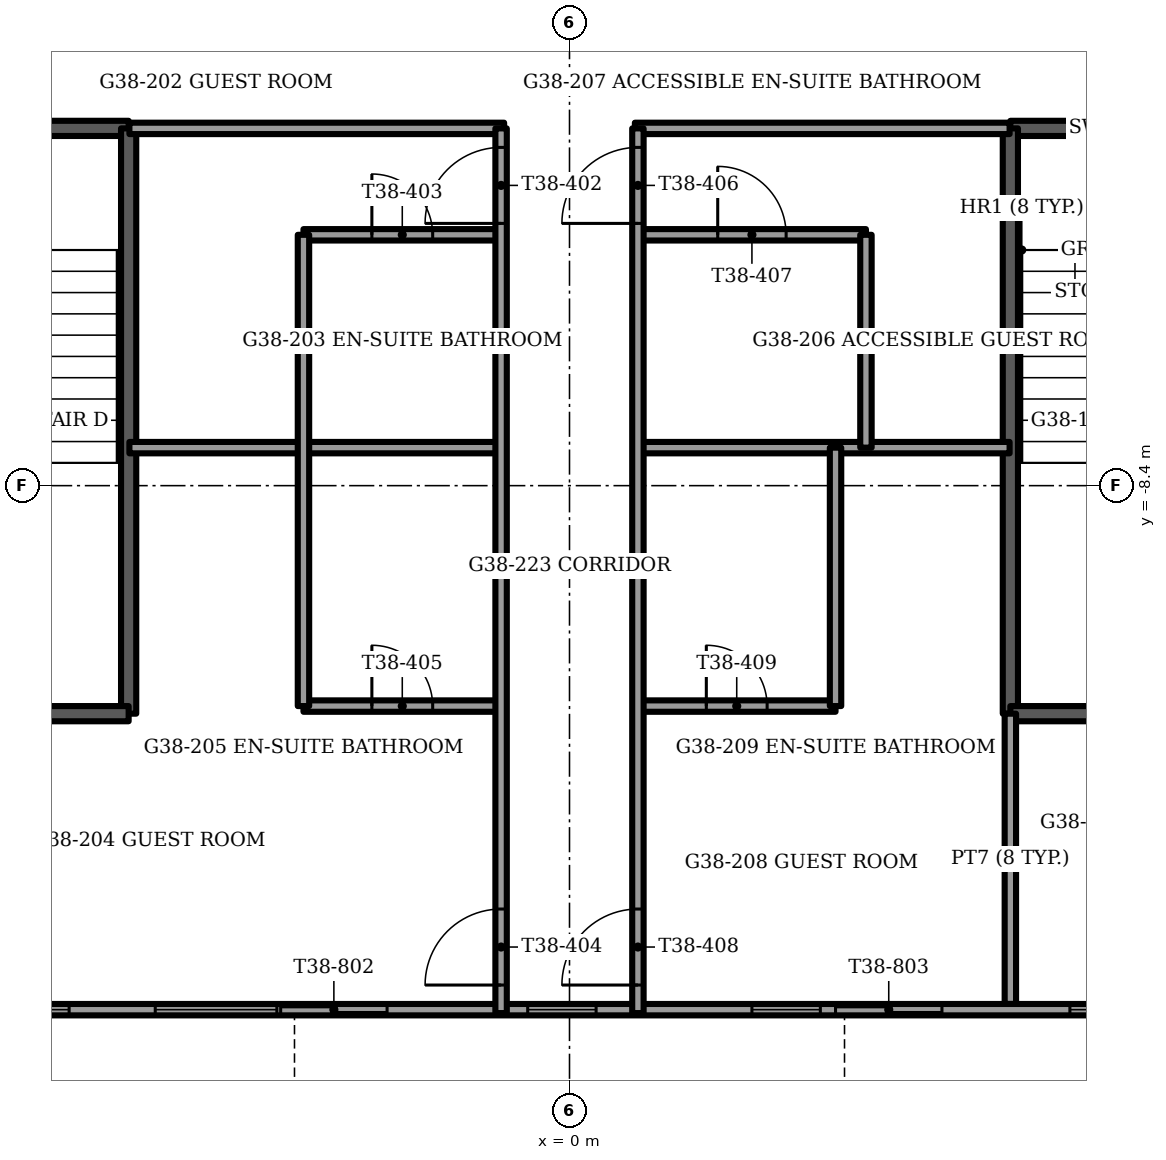
"""IFC4 building model, lengths in metres.
Left out: names, types, materials, properties, quantities, classifications, styles, units other than length and angle.
Written with IfcOpenShell. Run it as: python <this file> out.ifc"""

import sys

from ifc_helpers import new_model, si_unit, direction, frame, frame_2d, origin, place, context, subcontext, project, spatial, rectangle, extrude, element, fill, save


model = new_model("IFC4")
c1 = context("Model", 3, precision=1e-05, world=origin(), true_north=direction((0.0, 1.0)))
c2 = subcontext(c1, "Body", "Model", "MODEL_VIEW")
j1 = project(units=[si_unit("LENGTHUNIT", "METRE"), si_unit("PLANEANGLEUNIT", "RADIAN")], contexts=[c1])
p1 = place(None, origin())
s1 = spatial("IfcSite", under=j1, at=p1, CompositionType="ELEMENT")
p2 = place(p1, origin())
s2 = spatial("IfcBuilding", under=s1, at=p2, CompositionType="ELEMENT")
p3 = place(p2, frame((0.0, 0.0, 157.0)))
s3 = spatial("IfcBuildingStorey", under=s2, at=p3, CompositionType="ELEMENT", Elevation=157.0)
p4 = place(p3, frame((-8.366, -15.294, 0.0), z_axis=(0.0, 0.0, 1.0), x_axis=(1.0, 0.0, 0.0)))
e1 = element("IfcWall", 1, at=p4, inside=s3, PredefinedType="SOLIDWALL", context=c2, shape_type="SweptSolid", body=[
    extrude(rectangle(XDim=16.732, YDim=0.15, at=frame_2d((8.366, 0.0))), origin(), (0.0, 0.0, 1.0), 3.45),
])
p5 = place(p4, frame((2.916, 0.0, 0.15)))
e2 = element("IfcOpeningElement", 2, at=p5, cuts=e1, PredefinedType="OPENING", context=c2, shape_type="SweptSolid", body=[
    extrude(rectangle(XDim=1.6, YDim=2.85, at=frame_2d((0.8, 1.425))), frame((0.0, 0.075, 0.0), z_axis=(0.0, -1.0, 0.0), x_axis=(1.0, 0.0, 0.0)), (0.0, 0.0, 1.0), 0.15),
])
p6 = place(p4, frame((4.566, 0.0, 0.0)))
e3 = element("IfcOpeningElement", 3, at=p6, cuts=e1, PredefinedType="OPENING", context=c2, shape_type="SweptSolid", body=[
    extrude(rectangle(XDim=1.4, YDim=2.4, at=frame_2d((0.7, 1.2))), frame((0.0, 0.075, 0.0), z_axis=(0.0, -1.0, 0.0), x_axis=(1.0, 0.0, 0.0)), (0.0, 0.0, 1.0), 0.15),
])
p7 = place(p4, frame((7.816, 0.0, 0.15)))
e4 = element("IfcOpeningElement", 4, at=p7, cuts=e1, PredefinedType="OPENING", context=c2, shape_type="SweptSolid", body=[
    extrude(rectangle(XDim=0.9, YDim=2.85, at=frame_2d((0.45, 1.425))), frame((0.0, 0.075, 0.0), z_axis=(0.0, -1.0, 0.0), x_axis=(1.0, 0.0, 0.0)), (0.0, 0.0, 1.0), 0.15),
])
p8 = place(p4, frame((10.766, 0.0, 0.15)))
e5 = element("IfcOpeningElement", 5, at=p8, cuts=e1, PredefinedType="OPENING", context=c2, shape_type="SweptSolid", body=[
    extrude(rectangle(XDim=0.9, YDim=2.85, at=frame_2d((0.45, 1.425))), frame((0.0, 0.075, 0.0), z_axis=(0.0, -1.0, 0.0), x_axis=(1.0, 0.0, 0.0)), (0.0, 0.0, 1.0), 0.15),
])
p9 = place(p4, frame((11.866, 0.0, 0.0)))
e6 = element("IfcOpeningElement", 6, at=p9, cuts=e1, PredefinedType="OPENING", context=c2, shape_type="SweptSolid", body=[
    extrude(rectangle(XDim=1.4, YDim=2.4, at=frame_2d((0.7, 1.2))), frame((0.0, 0.075, 0.0), z_axis=(0.0, -1.0, 0.0), x_axis=(1.0, 0.0, 0.0)), (0.0, 0.0, 1.0), 0.15),
])
p10 = place(p4, frame((0.183, 0.0, 0.15)))
e7 = element("IfcOpeningElement", 7, at=p10, cuts=e1, PredefinedType="OPENING", context=c2, shape_type="SweptSolid", body=[
    extrude(rectangle(XDim=1.6, YDim=2.73, at=frame_2d((0.8, 1.365))), frame((0.0, 0.075, 0.0), z_axis=(0.0, -1.0, 0.0), x_axis=(1.0, 0.0, 0.0)), (0.0, 0.0, 1.0), 0.15),
])
p11 = place(p4, frame((14.949, 0.0, 0.15)))
e8 = element("IfcOpeningElement", 8, at=p11, cuts=e1, PredefinedType="OPENING", context=c2, shape_type="SweptSolid", body=[
    extrude(rectangle(XDim=1.6, YDim=2.73, at=frame_2d((0.8, 1.365))), frame((0.0, 0.075, 0.0), z_axis=(0.0, -1.0, 0.0), x_axis=(1.0, 0.0, 0.0)), (0.0, 0.0, 1.0), 0.15),
])
p12 = place(p3, frame((5.8, -3.7, -0.3), z_axis=(0.0, 0.0, 1.0), x_axis=(1.0, 0.0, 0.0)))
e9 = element("IfcWall", 9, at=p12, inside=s3, PredefinedType="SOLIDWALL", context=c2, shape_type="SweptSolid", body=[
    extrude(rectangle(XDim=3.35, YDim=0.2, at=frame_2d((1.675, 0.0))), origin(), (0.0, 0.0, 1.0), 3.75),
])
p13 = place(p12, frame((1.125, 0.0, 0.0)))
e10 = element("IfcOpeningElement", 10, at=p13, cuts=e9, PredefinedType="OPENING", context=c2, shape_type="SweptSolid", body=[
    extrude(rectangle(XDim=1.1, YDim=2.1, at=frame_2d((0.55, 1.05))), frame((0.0, 0.1, 0.0), z_axis=(0.0, -1.0, 0.0), x_axis=(1.0, 0.0, 0.0)), (0.0, 0.0, 1.0), 0.2),
])
p14 = place(p3, frame((5.8, -3.7, -0.3), z_axis=(0.0, 0.0, 1.0), x_axis=(0.0, -1.0, 0.0)))
e11 = element("IfcWall", 11, at=p14, inside=s3, PredefinedType="SOLIDWALL", context=c2, shape_type="SweptSolid", body=[
    extrude(rectangle(XDim=7.7, YDim=0.2, at=frame_2d((3.85, 0.0))), origin(), (0.0, 0.0, 1.0), 3.75),
])
p15 = place(p3, frame((5.8, -11.4, -0.3), z_axis=(0.0, 0.0, 1.0), x_axis=(1.0, 0.0, 0.0)))
e12 = element("IfcWall", 12, at=p15, inside=s3, PredefinedType="SOLIDWALL", context=c2, shape_type="SweptSolid", body=[
    extrude(rectangle(XDim=3.35, YDim=0.2, at=frame_2d((1.675, 0.0))), origin(), (0.0, 0.0, 1.0), 3.75),
])
p16 = place(p3, frame((5.8, -11.4, 0.0), z_axis=(0.0, 0.0, 1.0), x_axis=(0.0, -1.0, 0.0)))
e13 = element("IfcWall", 13, at=p16, inside=s3, PredefinedType="PARTITIONING", context=c2, shape_type="SweptSolid", body=[
    extrude(rectangle(XDim=3.819, YDim=0.15, at=frame_2d((1.91, 0.0))), origin(), (0.0, 0.0, 1.0), 3.45),
])
p17 = place(p3, frame((-9.15, -3.7, -0.3), z_axis=(0.0, 0.0, 1.0), x_axis=(1.0, 0.0, 0.0)))
e14 = element("IfcWall", 14, at=p17, inside=s3, PredefinedType="SOLIDWALL", context=c2, shape_type="SweptSolid", body=[
    extrude(rectangle(XDim=3.35, YDim=0.2, at=frame_2d((1.675, 0.0))), origin(), (0.0, 0.0, 1.0), 3.75),
])
p18 = place(p17, frame((1.125, 0.0, 0.0)))
e15 = element("IfcOpeningElement", 15, at=p18, cuts=e14, PredefinedType="OPENING", context=c2, shape_type="SweptSolid", body=[
    extrude(rectangle(XDim=1.1, YDim=2.1, at=frame_2d((0.55, 1.05))), frame((0.0, 0.1, 0.0), z_axis=(0.0, -1.0, 0.0), x_axis=(1.0, 0.0, 0.0)), (0.0, 0.0, 1.0), 0.2),
])
p19 = place(p3, frame((-5.8, -3.7, -0.3), z_axis=(0.0, 0.0, 1.0), x_axis=(0.0, -1.0, 0.0)))
e16 = element("IfcWall", 16, at=p19, inside=s3, PredefinedType="SOLIDWALL", context=c2, shape_type="SweptSolid", body=[
    extrude(rectangle(XDim=7.7, YDim=0.2, at=frame_2d((3.85, 0.0))), origin(), (0.0, 0.0, 1.0), 3.75),
])
p20 = place(p3, frame((-9.15, -11.4, -0.3), z_axis=(0.0, 0.0, 1.0), x_axis=(1.0, 0.0, 0.0)))
e17 = element("IfcWall", 17, at=p20, inside=s3, PredefinedType="SOLIDWALL", context=c2, shape_type="SweptSolid", body=[
    extrude(rectangle(XDim=3.35, YDim=0.2, at=frame_2d((1.675, 0.0))), origin(), (0.0, 0.0, 1.0), 3.75),
])
p21 = place(p3, frame((-3.5, -11.3, 0.0), z_axis=(0.0, 0.0, 1.0), x_axis=(1.0, 0.0, 0.0)))
e18 = element("IfcWall", 18, at=p21, inside=s3, PredefinedType="PARTITIONING", context=c2, shape_type="SweptSolid", body=[
    extrude(rectangle(XDim=2.6, YDim=0.15, at=frame_2d((1.3, 0.0))), origin(), (0.0, 0.0, 1.0), 3.45),
])
p22 = place(p21, frame((0.9, 0.0, 0.0)))
e19 = element("IfcOpeningElement", 19, at=p22, cuts=e18, PredefinedType="OPENING", context=c2, shape_type="SweptSolid", body=[
    extrude(rectangle(XDim=0.8, YDim=2.1, at=frame_2d((0.4, 1.05))), frame((0.0, 0.075, 0.0), z_axis=(0.0, -1.0, 0.0), x_axis=(1.0, 0.0, 0.0)), (0.0, 0.0, 1.0), 0.15),
])
p23 = place(p3, frame((0.9, -11.3, 0.0), z_axis=(0.0, 0.0, 1.0), x_axis=(1.0, 0.0, 0.0)))
e20 = element("IfcWall", 20, at=p23, inside=s3, PredefinedType="PARTITIONING", context=c2, shape_type="SweptSolid", body=[
    extrude(rectangle(XDim=2.6, YDim=0.15, at=frame_2d((1.3, 0.0))), origin(), (0.0, 0.0, 1.0), 3.45),
])
p24 = place(p23, frame((0.9, 0.0, 0.0)))
e21 = element("IfcOpeningElement", 21, at=p24, cuts=e20, PredefinedType="OPENING", context=c2, shape_type="SweptSolid", body=[
    extrude(rectangle(XDim=0.8, YDim=2.1, at=frame_2d((0.4, 1.05))), frame((0.0, 0.075, 0.0), z_axis=(0.0, -1.0, 0.0), x_axis=(1.0, 0.0, 0.0)), (0.0, 0.0, 1.0), 0.15),
])
for number, where, z_axis, x_axis in (
    (22, (-5.79, -7.9, 0.0), (0.0, 0.0, 1.0), (1.0, 0.0, 0.0)),
    (23, (0.9, -7.9, 0.0), (0.0, 0.0, 1.0), (1.0, 0.0, 0.0)),
):
    element("IfcWall", number, at=place(p3, frame(where, z_axis=z_axis, x_axis=x_axis)), inside=s3, PredefinedType="PARTITIONING", context=c2, shape_type="SweptSolid", body=[
        extrude(rectangle(XDim=4.89, YDim=0.15, at=frame_2d((2.445, 0.0))), origin(), (0.0, 0.0, 1.0), 3.45),
    ])
p25 = place(p3, frame((-3.5, -5.1, 0.0), z_axis=(0.0, 0.0, 1.0), x_axis=(1.0, 0.0, 0.0)))
e24 = element("IfcWall", 24, at=p25, inside=s3, PredefinedType="PARTITIONING", context=c2, shape_type="SweptSolid", body=[
    extrude(rectangle(XDim=2.6, YDim=0.15, at=frame_2d((1.3, 0.0))), origin(), (0.0, 0.0, 1.0), 3.45),
])
p26 = place(p25, frame((0.9, 0.0, 0.0)))
e25 = element("IfcOpeningElement", 25, at=p26, cuts=e24, PredefinedType="OPENING", context=c2, shape_type="SweptSolid", body=[
    extrude(rectangle(XDim=0.8, YDim=2.1, at=frame_2d((0.4, 1.05))), frame((0.0, 0.075, 0.0), z_axis=(0.0, -1.0, 0.0), x_axis=(1.0, 0.0, 0.0)), (0.0, 0.0, 1.0), 0.15),
])
p27 = place(p3, frame((0.9, -5.1, 0.0), z_axis=(0.0, 0.0, 1.0), x_axis=(1.0, 0.0, 0.0)))
e26 = element("IfcWall", 26, at=p27, inside=s3, PredefinedType="PARTITIONING", context=c2, shape_type="SweptSolid", body=[
    extrude(rectangle(XDim=3.0, YDim=0.15, at=frame_2d((1.5, 0.0))), origin(), (0.0, 0.0, 1.0), 3.45),
])
p28 = place(p27, frame((1.05, 0.0, 0.0)))
e27 = element("IfcOpeningElement", 27, at=p28, cuts=e26, PredefinedType="OPENING", context=c2, shape_type="SweptSolid", body=[
    extrude(rectangle(XDim=0.9, YDim=2.1, at=frame_2d((0.45, 1.05))), frame((0.0, 0.075, 0.0), z_axis=(0.0, -1.0, 0.0), x_axis=(1.0, 0.0, 0.0)), (0.0, 0.0, 1.0), 0.15),
])
for number, where, z_axis, x_axis in (
    (28, (-5.79, -3.7, 0.0), (0.0, 0.0, 1.0), (1.0, 0.0, 0.0)),
    (29, (0.86, -3.7, 0.0), (0.0, 0.0, 1.0), (1.0, 0.0, 0.0)),
):
    element("IfcWall", number, at=place(p3, frame(where, z_axis=z_axis, x_axis=x_axis)), inside=s3, PredefinedType="PARTITIONING", context=c2, shape_type="SweptSolid", body=[
        extrude(rectangle(XDim=4.93, YDim=0.15, at=frame_2d((2.465, 0.0))), origin(), (0.0, 0.0, 1.0), 3.45),
    ])
p29 = place(p3, frame((3.9, -7.9, 0.0), z_axis=(0.0, 0.0, 1.0), x_axis=(0.0, 1.0, 0.0)))
e30 = element("IfcWall", 30, at=p29, inside=s3, PredefinedType="PARTITIONING", context=c2, shape_type="SweptSolid", body=[
    extrude(rectangle(XDim=2.8, YDim=0.15, at=frame_2d((1.4, 0.0))), origin(), (0.0, 0.0, 1.0), 3.45),
])
p30 = place(p3, frame((3.5, -11.3, 0.0), z_axis=(0.0, 0.0, 1.0), x_axis=(0.0, 1.0, 0.0)))
e31 = element("IfcWall", 31, at=p30, inside=s3, PredefinedType="PARTITIONING", context=c2, shape_type="SweptSolid", body=[
    extrude(rectangle(XDim=3.4, YDim=0.15, at=frame_2d((1.7, 0.0))), origin(), (0.0, 0.0, 1.0), 3.45),
])
p31 = place(p3, frame((0.9, -15.339, 0.0), z_axis=(0.0, 0.0, 1.0), x_axis=(0.0, 1.0, 0.0)))
e32 = element("IfcWall", 32, at=p31, inside=s3, PredefinedType="PARTITIONING", context=c2, shape_type="SweptSolid", body=[
    extrude(rectangle(XDim=11.639, YDim=0.15, at=frame_2d((5.82, 0.0))), origin(), (0.0, 0.0, 1.0), 3.45),
])
p32 = place(p31, frame((10.389, 0.0, 0.0)))
e33 = element("IfcOpeningElement", 33, at=p32, cuts=e32, PredefinedType="OPENING", context=c2, shape_type="SweptSolid", body=[
    extrude(rectangle(XDim=1.0, YDim=2.1, at=frame_2d((0.5, 1.05))), frame((0.0, 0.075, 0.0), z_axis=(0.0, -1.0, 0.0), x_axis=(1.0, 0.0, 0.0)), (0.0, 0.0, 1.0), 0.15),
])
p33 = place(p31, frame((0.369, 0.0, 0.0)))
e34 = element("IfcOpeningElement", 34, at=p33, cuts=e32, PredefinedType="OPENING", context=c2, shape_type="SweptSolid", body=[
    extrude(rectangle(XDim=1.0, YDim=2.1, at=frame_2d((0.5, 1.05))), frame((0.0, 0.075, 0.0), z_axis=(0.0, -1.0, 0.0), x_axis=(1.0, 0.0, 0.0)), (0.0, 0.0, 1.0), 0.15),
])
p34 = place(p3, frame((-0.9, -15.339, 0.0), z_axis=(0.0, 0.0, 1.0), x_axis=(0.0, 1.0, 0.0)))
e35 = element("IfcWall", 35, at=p34, inside=s3, PredefinedType="PARTITIONING", context=c2, shape_type="SweptSolid", body=[
    extrude(rectangle(XDim=11.639, YDim=0.15, at=frame_2d((5.82, 0.0))), origin(), (0.0, 0.0, 1.0), 3.45),
])
p35 = place(p34, frame((10.389, 0.0, 0.0)))
e36 = element("IfcOpeningElement", 36, at=p35, cuts=e35, PredefinedType="OPENING", context=c2, shape_type="SweptSolid", body=[
    extrude(rectangle(XDim=1.0, YDim=2.1, at=frame_2d((0.5, 1.05))), frame((0.0, 0.075, 0.0), z_axis=(0.0, -1.0, 0.0), x_axis=(1.0, 0.0, 0.0)), (0.0, 0.0, 1.0), 0.15),
])
p36 = place(p34, frame((0.369, 0.0, 0.0)))
e37 = element("IfcOpeningElement", 37, at=p36, cuts=e35, PredefinedType="OPENING", context=c2, shape_type="SweptSolid", body=[
    extrude(rectangle(XDim=1.0, YDim=2.1, at=frame_2d((0.5, 1.05))), frame((0.0, 0.075, 0.0), z_axis=(0.0, -1.0, 0.0), x_axis=(1.0, 0.0, 0.0)), (0.0, 0.0, 1.0), 0.15),
])
p37 = place(p3, frame((-3.5, -11.3, 0.0), z_axis=(0.0, 0.0, 1.0), x_axis=(0.0, 1.0, 0.0)))
e38 = element("IfcWall", 38, at=p37, inside=s3, PredefinedType="PARTITIONING", context=c2, shape_type="SweptSolid", body=[
    extrude(rectangle(XDim=6.2, YDim=0.15, at=frame_2d((3.1, 0.0))), origin(), (0.0, 0.0, 1.0), 3.45),
])
p38 = place(p5, origin())
e39 = element("IfcWindow", 39, at=p38, inside=s3, PartitioningType="SINGLE_PANEL", PredefinedType="WINDOW", context=c2, shape_type="SweptSolid", body=[
    extrude(rectangle(XDim=1.6, YDim=2.85, at=frame_2d((0.8, 1.425))), frame((0.0, 0.03, 0.0), z_axis=(0.0, -1.0, 0.0), x_axis=(1.0, 0.0, 0.0)), (0.0, 0.0, 1.0), 0.06),
])
fill(e2, e39)
p39 = place(p6, origin())
e40 = element("IfcDoor", 40, at=p39, inside=s3, OperationType="SLIDING_TO_LEFT", PredefinedType="DOOR", context=c2, shape_type="SweptSolid", body=[
    extrude(rectangle(XDim=1.4, YDim=2.4, at=frame_2d((0.7, 1.2))), frame((0.0, 0.025, 0.0), z_axis=(0.0, -1.0, 0.0), x_axis=(1.0, 0.0, 0.0)), (0.0, 0.0, 1.0), 0.05),
])
fill(e3, e40)
p40 = place(p7, origin())
e41 = element("IfcWindow", 41, at=p40, inside=s3, PartitioningType="SINGLE_PANEL", PredefinedType="WINDOW", context=c2, shape_type="SweptSolid", body=[
    extrude(rectangle(XDim=0.9, YDim=2.85, at=frame_2d((0.45, 1.425))), frame((0.0, 0.03, 0.0), z_axis=(0.0, -1.0, 0.0), x_axis=(1.0, 0.0, 0.0)), (0.0, 0.0, 1.0), 0.06),
])
fill(e4, e41)
p41 = place(p8, origin())
e42 = element("IfcWindow", 42, at=p41, inside=s3, PartitioningType="SINGLE_PANEL", PredefinedType="WINDOW", context=c2, shape_type="SweptSolid", body=[
    extrude(rectangle(XDim=0.9, YDim=2.85, at=frame_2d((0.45, 1.425))), frame((0.0, 0.03, 0.0), z_axis=(0.0, -1.0, 0.0), x_axis=(1.0, 0.0, 0.0)), (0.0, 0.0, 1.0), 0.06),
])
fill(e5, e42)
p42 = place(p9, origin())
e43 = element("IfcDoor", 43, at=p42, inside=s3, OperationType="SLIDING_TO_LEFT", PredefinedType="DOOR", context=c2, shape_type="SweptSolid", body=[
    extrude(rectangle(XDim=1.4, YDim=2.4, at=frame_2d((0.7, 1.2))), frame((0.0, 0.025, 0.0), z_axis=(0.0, -1.0, 0.0), x_axis=(1.0, 0.0, 0.0)), (0.0, 0.0, 1.0), 0.05),
])
fill(e6, e43)
p43 = place(p10, origin())
e44 = element("IfcWindow", 44, at=p43, inside=s3, PartitioningType="SINGLE_PANEL", PredefinedType="WINDOW", context=c2, shape_type="SweptSolid", body=[
    extrude(rectangle(XDim=1.6, YDim=2.73, at=frame_2d((0.8, 1.365))), frame((0.0, 0.03, 0.0), z_axis=(0.0, -1.0, 0.0), x_axis=(1.0, 0.0, 0.0)), (0.0, 0.0, 1.0), 0.06),
])
fill(e7, e44)
p44 = place(p11, origin())
e45 = element("IfcWindow", 45, at=p44, inside=s3, PartitioningType="SINGLE_PANEL", PredefinedType="WINDOW", context=c2, shape_type="SweptSolid", body=[
    extrude(rectangle(XDim=1.6, YDim=2.73, at=frame_2d((0.8, 1.365))), frame((0.0, 0.03, 0.0), z_axis=(0.0, -1.0, 0.0), x_axis=(1.0, 0.0, 0.0)), (0.0, 0.0, 1.0), 0.06),
])
fill(e8, e45)
p45 = place(p35, origin())
e46 = element("IfcDoor", 46, at=p45, inside=s3, OperationType="SINGLE_SWING_RIGHT", PredefinedType="DOOR", context=c2, shape_type="SweptSolid", body=[
    extrude(rectangle(XDim=1.0, YDim=2.1, at=frame_2d((0.5, 1.05))), frame((0.0, 0.025, 0.0), z_axis=(0.0, -1.0, 0.0), x_axis=(1.0, 0.0, 0.0)), (0.0, 0.0, 1.0), 0.05),
])
fill(e36, e46)
p46 = place(p26, origin())
e47 = element("IfcDoor", 47, at=p46, inside=s3, OperationType="SINGLE_SWING_RIGHT", PredefinedType="DOOR", context=c2, shape_type="SweptSolid", body=[
    extrude(rectangle(XDim=0.8, YDim=2.1, at=frame_2d((0.4, 1.05))), frame((0.0, 0.025, 0.0), z_axis=(0.0, -1.0, 0.0), x_axis=(1.0, 0.0, 0.0)), (0.0, 0.0, 1.0), 0.05),
])
fill(e25, e47)
p47 = place(p36, origin())
e48 = element("IfcDoor", 48, at=p47, inside=s3, OperationType="SINGLE_SWING_LEFT", PredefinedType="DOOR", context=c2, shape_type="SweptSolid", body=[
    extrude(rectangle(XDim=1.0, YDim=2.1, at=frame_2d((0.5, 1.05))), frame((0.0, 0.025, 0.0), z_axis=(0.0, -1.0, 0.0), x_axis=(1.0, 0.0, 0.0)), (0.0, 0.0, 1.0), 0.05),
])
fill(e37, e48)
p48 = place(p22, origin())
e49 = element("IfcDoor", 49, at=p48, inside=s3, OperationType="SINGLE_SWING_RIGHT", PredefinedType="DOOR", context=c2, shape_type="SweptSolid", body=[
    extrude(rectangle(XDim=0.8, YDim=2.1, at=frame_2d((0.4, 1.05))), frame((0.0, 0.025, 0.0), z_axis=(0.0, -1.0, 0.0), x_axis=(1.0, 0.0, 0.0)), (0.0, 0.0, 1.0), 0.05),
])
fill(e19, e49)
p49 = place(p32, origin())
e50 = element("IfcDoor", 50, at=p49, inside=s3, OperationType="SINGLE_SWING_RIGHT", PredefinedType="DOOR", context=c2, shape_type="SweptSolid", body=[
    extrude(rectangle(XDim=1.0, YDim=2.1, at=frame_2d((0.5, 1.05))), frame((0.0, 0.025, 0.0), z_axis=(0.0, -1.0, 0.0), x_axis=(1.0, 0.0, 0.0)), (0.0, 0.0, 1.0), 0.05),
])
fill(e33, e50)
p50 = place(p28, origin())
e51 = element("IfcDoor", 51, at=p50, inside=s3, OperationType="SINGLE_SWING_LEFT", PredefinedType="DOOR", context=c2, shape_type="SweptSolid", body=[
    extrude(rectangle(XDim=0.9, YDim=2.1, at=frame_2d((0.45, 1.05))), frame((0.0, 0.025, 0.0), z_axis=(0.0, -1.0, 0.0), x_axis=(1.0, 0.0, 0.0)), (0.0, 0.0, 1.0), 0.05),
])
fill(e27, e51)
p51 = place(p33, origin())
e52 = element("IfcDoor", 52, at=p51, inside=s3, OperationType="SINGLE_SWING_LEFT", PredefinedType="DOOR", context=c2, shape_type="SweptSolid", body=[
    extrude(rectangle(XDim=1.0, YDim=2.1, at=frame_2d((0.5, 1.05))), frame((0.0, 0.025, 0.0), z_axis=(0.0, -1.0, 0.0), x_axis=(1.0, 0.0, 0.0)), (0.0, 0.0, 1.0), 0.05),
])
fill(e34, e52)
p52 = place(p24, origin())
e53 = element("IfcDoor", 53, at=p52, inside=s3, OperationType="SINGLE_SWING_LEFT", PredefinedType="DOOR", context=c2, shape_type="SweptSolid", body=[
    extrude(rectangle(XDim=0.8, YDim=2.1, at=frame_2d((0.4, 1.05))), frame((0.0, 0.025, 0.0), z_axis=(0.0, -1.0, 0.0), x_axis=(1.0, 0.0, 0.0)), (0.0, 0.0, 1.0), 0.05),
])
fill(e21, e53)
save(model, sys.argv[1])
